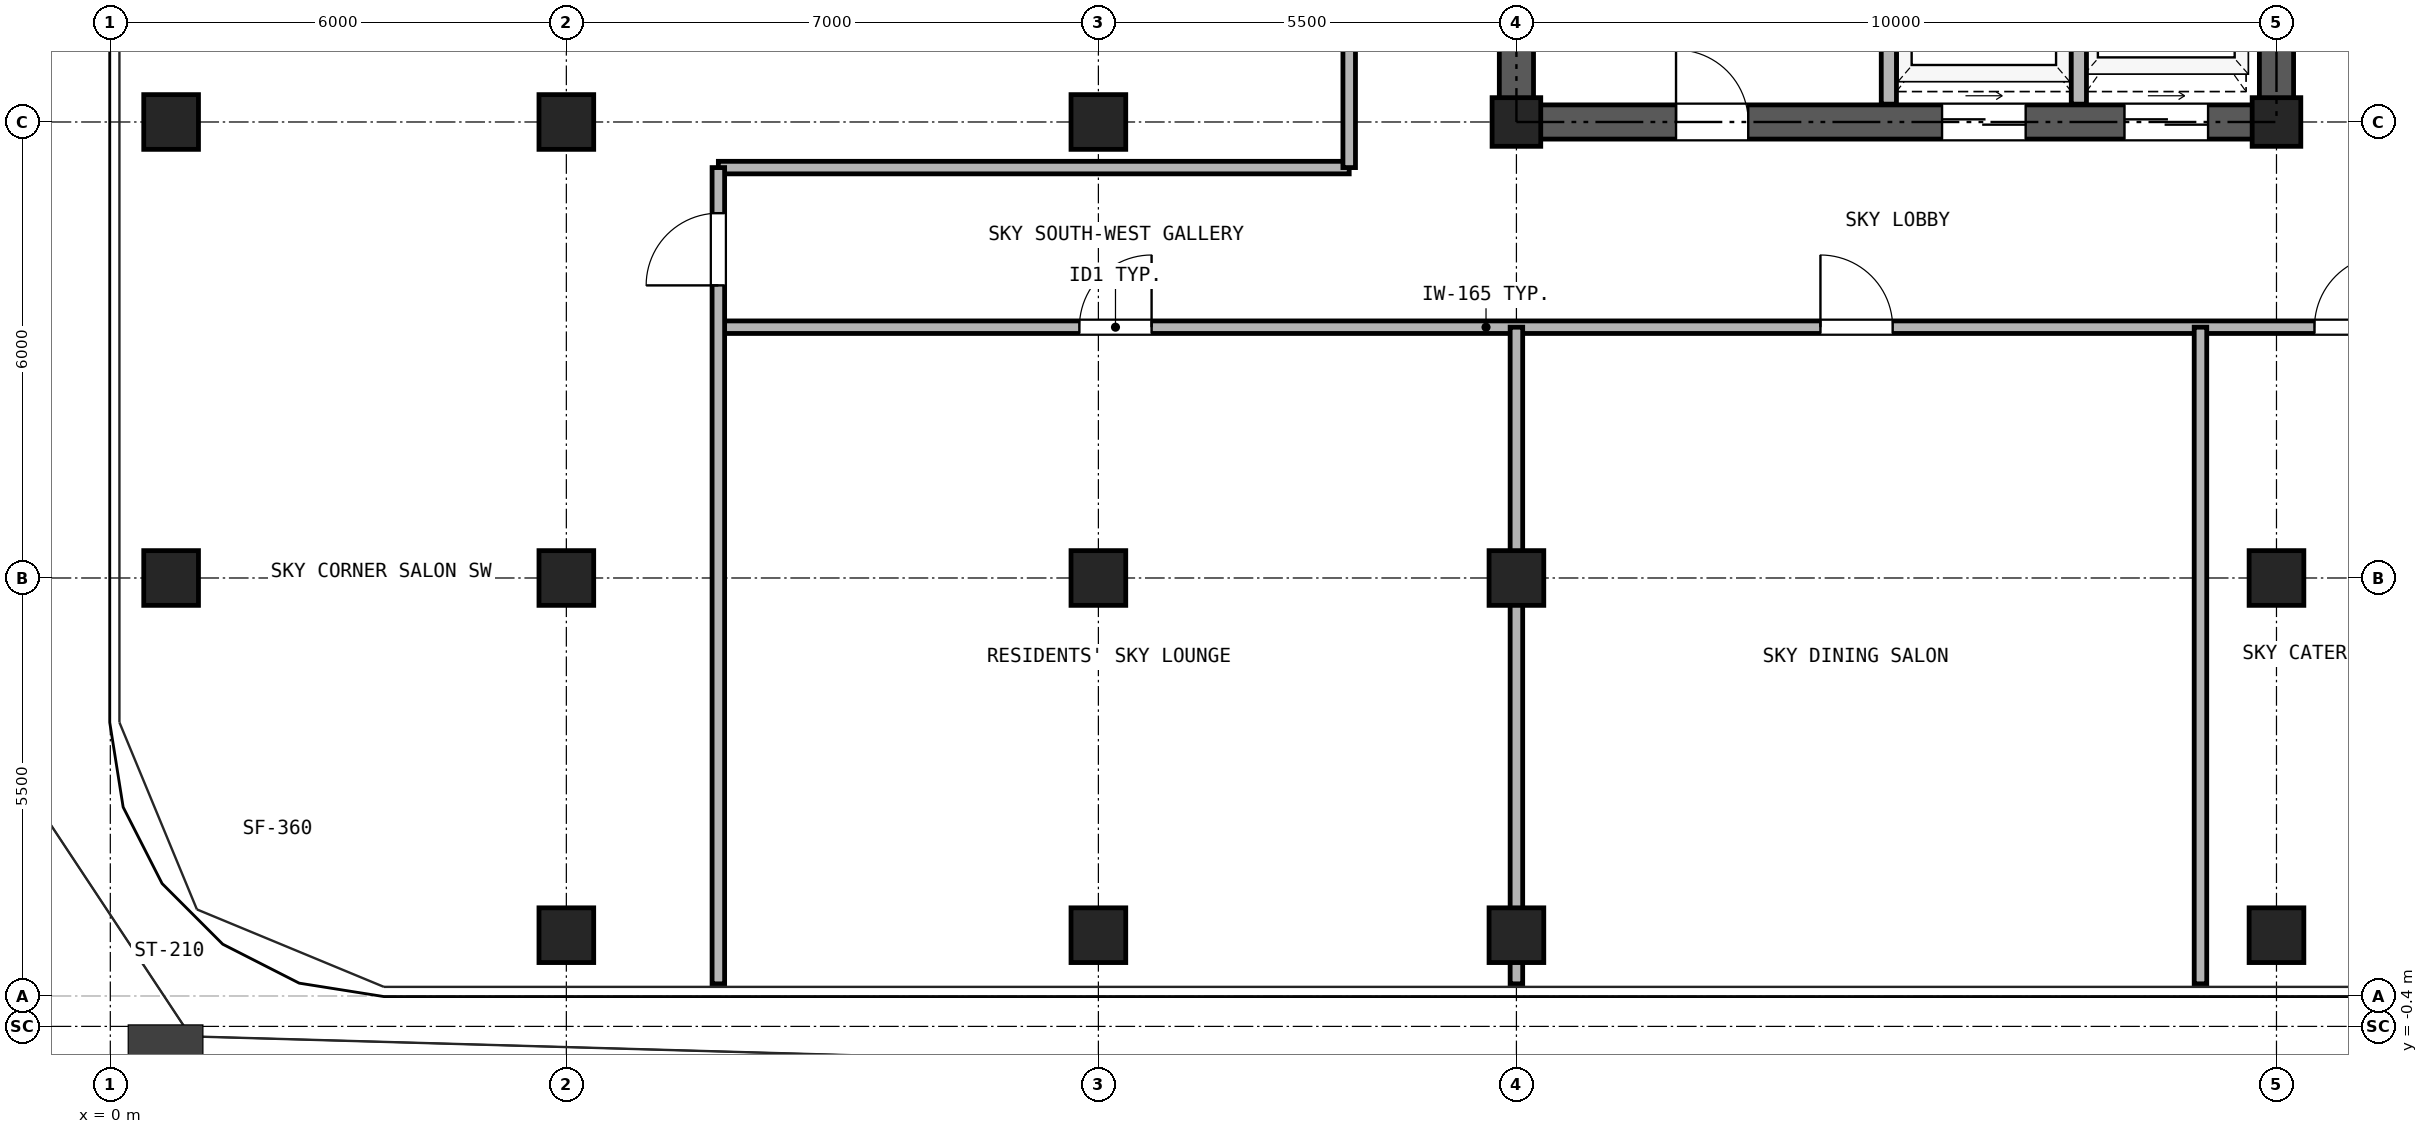
"""IFC4 building model, lengths in metres.
Left out: names, types, materials, properties, quantities, classifications, styles, units other than length and angle.
Written with IfcOpenShell. Run it as: python <this file> out.ifc"""

import sys

from ifc_helpers import new_model, si_unit, direction, frame, frame_2d, origin, origin_2d, place, context, subcontext, project, spatial, rectangle, hollow_rectangle, extrude, source, transform, mapped, element, fill, save


model = new_model("IFC4")
c1 = context("Model", 3, precision=1e-05, world=origin(), true_north=direction((0.0, 1.0)))
c2 = subcontext(c1, "Body", "Model", "MODEL_VIEW")
j1 = project(units=[si_unit("LENGTHUNIT", "METRE"), si_unit("PLANEANGLEUNIT", "RADIAN")], contexts=[c1])
p1 = place(None, origin())
s1 = spatial("IfcSite", under=j1, at=p1, CompositionType="ELEMENT")
p2 = place(p1, origin())
s2 = spatial("IfcBuilding", under=s1, at=p2, CompositionType="ELEMENT")
p3 = place(p2, frame((0.0, 0.0, 151.6)))
s3 = spatial("IfcBuildingStorey", under=s2, at=p3, CompositionType="ELEMENT", Elevation=151.6)
m1 = source(origin(), c2, "Body", "SweptSolid", [
    extrude(hollow_rectangle(XDim=0.72, YDim=0.72, WallThickness=0.04, at=origin_2d()), origin(), (0.0, 0.0, 1.0), 4.25),
])
for number, where, z_axis, x_axis in (
    (1, (6.0, 0.8, 0.0), (0.0, 0.0, 1.0), (1.0, 0.0, 0.0)),
    (2, (13.0, 0.8, 0.0), (0.0, 0.0, 1.0), (1.0, 0.0, 0.0)),
    (3, (18.5, 0.8, 0.0), (0.0, 0.0, 1.0), (1.0, 0.0, 0.0)),
    (4, (28.5, 0.8, 0.0), (0.0, 0.0, 1.0), (1.0, 0.0, 0.0)),
    (5, (0.8, 5.5, 0.0), (0.0, 0.0, 1.0), (1.0, 0.0, 0.0)),
    (6, (0.8, 11.5, 0.0), (0.0, 0.0, 1.0), (1.0, 0.0, 0.0)),
    (7, (6.0, 5.5, 0.0), (0.0, 0.0, 1.0), (1.0, 0.0, 0.0)),
    (8, (6.0, 11.5, 0.0), (0.0, 0.0, 1.0), (1.0, 0.0, 0.0)),
    (9, (13.0, 5.5, 0.0), (0.0, 0.0, 1.0), (1.0, 0.0, 0.0)),
    (10, (13.0, 11.5, 0.0), (0.0, 0.0, 1.0), (1.0, 0.0, 0.0)),
    (11, (18.5, 5.5, 0.0), (0.0, 0.0, 1.0), (1.0, 0.0, 0.0)),
):
    element("IfcColumn", number, at=place(p3, frame(where, z_axis=z_axis, x_axis=x_axis)), inside=s3, PredefinedType="COLUMN", context=c2, shape_type="MappedRepresentation", body=[
        mapped(m1, transform((0.0, 0.0, 0.0), x_axis=(1.0, 0.0, 0.0), y_axis=(0.0, 1.0, 0.0), z_axis=(0.0, 0.0, 1.0), scale=1.0)),
    ])
m2 = source(origin(), c2, "Body", "SweptSolid", [
    extrude(hollow_rectangle(XDim=0.64, YDim=0.64, WallThickness=0.035, at=origin_2d()), origin(), (0.0, 0.0, 1.0), 4.25),
])
p4 = place(p3, frame((18.5, 11.5, 0.0), z_axis=(0.0, 0.0, 1.0), x_axis=(1.0, 0.0, 0.0)))
e12 = element("IfcColumn", 12, at=p4, inside=s3, PredefinedType="COLUMN", context=c2, shape_type="MappedRepresentation", body=[
    mapped(m2, transform((0.0, 0.0, 0.0), x_axis=(1.0, 0.0, 0.0), y_axis=(0.0, 1.0, 0.0), z_axis=(0.0, 0.0, 1.0), scale=1.0)),
])
p5 = place(p3, frame((28.5, 5.5, 0.0), z_axis=(0.0, 0.0, 1.0), x_axis=(1.0, 0.0, 0.0)))
e13 = element("IfcColumn", 13, at=p5, inside=s3, PredefinedType="COLUMN", context=c2, shape_type="MappedRepresentation", body=[
    mapped(m1, transform((0.0, 0.0, 0.0), x_axis=(1.0, 0.0, 0.0), y_axis=(0.0, 1.0, 0.0), z_axis=(0.0, 0.0, 1.0), scale=1.0)),
])
p6 = place(p3, frame((28.5, 11.5, 0.0), z_axis=(0.0, 0.0, 1.0), x_axis=(1.0, 0.0, 0.0)))
e14 = element("IfcColumn", 14, at=p6, inside=s3, PredefinedType="COLUMN", context=c2, shape_type="MappedRepresentation", body=[
    mapped(m2, transform((0.0, 0.0, 0.0), x_axis=(1.0, 0.0, 0.0), y_axis=(0.0, 1.0, 0.0), z_axis=(0.0, 0.0, 1.0), scale=1.0)),
])
p7 = place(p3, frame((18.275, 11.5, 0.0), z_axis=(0.0, 0.0, 1.0), x_axis=(1.0, 0.0, 0.0)))
e15 = element("IfcWall", 15, at=p7, inside=s3, PredefinedType="SHEAR", context=c2, shape_type="SweptSolid", body=[
    extrude(rectangle(XDim=10.45, YDim=0.45, at=frame_2d((5.225, 0.0))), origin(), (0.0, 0.0, 1.0), 4.25),
])
p8 = place(p7, frame((2.325, 0.0, 0.0)))
e16 = element("IfcOpeningElement", 16, at=p8, cuts=e15, PredefinedType="OPENING", context=c2, shape_type="SweptSolid", body=[
    extrude(rectangle(XDim=0.95, YDim=2.15, at=frame_2d((0.475, 1.075))), frame((0.0, 0.235, 0.0), z_axis=(0.0, -1.0, 0.0), x_axis=(1.0, 0.0, 0.0)), (0.0, 0.0, 1.0), 0.47),
])
p9 = place(p7, frame((5.825, 0.0, 0.0)))
e17 = element("IfcOpeningElement", 17, at=p9, cuts=e15, PredefinedType="OPENING", context=c2, shape_type="SweptSolid", body=[
    extrude(rectangle(XDim=1.1, YDim=2.25, at=frame_2d((0.55, 1.125))), frame((0.0, 0.235, 0.0), z_axis=(0.0, -1.0, 0.0), x_axis=(1.0, 0.0, 0.0)), (0.0, 0.0, 1.0), 0.47),
])
p10 = place(p7, frame((8.225, 0.0, 0.0)))
e18 = element("IfcOpeningElement", 18, at=p10, cuts=e15, PredefinedType="OPENING", context=c2, shape_type="SweptSolid", body=[
    extrude(rectangle(XDim=1.1, YDim=2.25, at=frame_2d((0.55, 1.125))), frame((0.0, 0.235, 0.0), z_axis=(0.0, -1.0, 0.0), x_axis=(1.0, 0.0, 0.0)), (0.0, 0.0, 1.0), 0.47),
])
p11 = place(p3, frame((18.5, 11.725, 0.0), z_axis=(0.0, 0.0, 1.0), x_axis=(0.0, 1.0, 0.0)))
e19 = element("IfcWall", 19, at=p11, inside=s3, PredefinedType="SHEAR", context=c2, shape_type="SweptSolid", body=[
    extrude(rectangle(XDim=16.8, YDim=0.45, at=frame_2d((8.4, 0.0))), origin(), (0.0, 0.0, 1.0), 4.25),
])
p12 = place(p11, frame((7.425, 0.0, 0.0)))
e20 = element("IfcOpeningElement", 20, at=p12, cuts=e19, PredefinedType="OPENING", context=c2, shape_type="SweptSolid", body=[
    extrude(rectangle(XDim=1.15, YDim=2.2, at=frame_2d((0.575, 1.1))), frame((0.0, 0.235, 0.0), z_axis=(0.0, -1.0, 0.0), x_axis=(1.0, 0.0, 0.0)), (0.0, 0.0, 1.0), 0.47),
])
p13 = place(p3, frame((28.5, 11.725, 0.0), z_axis=(0.0, 0.0, 1.0), x_axis=(0.0, 1.0, 0.0)))
e21 = element("IfcWall", 21, at=p13, inside=s3, PredefinedType="SHEAR", context=c2, shape_type="SweptSolid", body=[
    extrude(rectangle(XDim=16.8, YDim=0.45, at=frame_2d((8.4, 0.0))), origin(), (0.0, 0.0, 1.0), 4.25),
])
p14 = place(p13, frame((7.425, 0.0, 0.0)))
e22 = element("IfcOpeningElement", 22, at=p14, cuts=e21, PredefinedType="OPENING", context=c2, shape_type="SweptSolid", body=[
    extrude(rectangle(XDim=1.15, YDim=2.2, at=frame_2d((0.575, 1.1))), frame((0.0, 0.235, 0.0), z_axis=(0.0, -1.0, 0.0), x_axis=(1.0, 0.0, 0.0)), (0.0, 0.0, 1.0), 0.47),
])
for number, where, z_axis, x_axis in (
    (23, (23.4, 11.735, 0.0), (0.0, 0.0, 1.0), (0.0, 1.0, 0.0)),
    (24, (25.9, 11.735, 0.0), (0.0, 0.0, 1.0), (0.0, 1.0, 0.0)),
):
    element("IfcWall", number, at=place(p3, frame(where, z_axis=z_axis, x_axis=x_axis)), inside=s3, PredefinedType="PARTITIONING", context=c2, shape_type="SweptSolid", body=[
        extrude(rectangle(XDim=3.265, YDim=0.2, at=frame_2d((1.632, 0.0))), origin(), (0.0, 0.0, 1.0), 4.25),
    ])
p15 = place(p3, frame((8.0, 8.8, 0.0), z_axis=(0.0, 0.0, 1.0), x_axis=(1.0, 0.0, 0.0)))
e25 = element("IfcWall", 25, at=p15, inside=s3, PredefinedType="PARTITIONING", context=c2, shape_type="SweptSolid", body=[
    extrude(rectangle(XDim=27.64, YDim=0.165, at=frame_2d((13.82, 0.0))), origin(), (0.0, 0.0, 1.0), 4.25),
])
p16 = place(p15, frame((4.75, 0.0, 0.0)))
e26 = element("IfcOpeningElement", 26, at=p16, cuts=e25, PredefinedType="OPENING", context=c2, shape_type="SweptSolid", body=[
    extrude(rectangle(XDim=0.95, YDim=2.15, at=frame_2d((0.475, 1.075))), frame((0.0, 0.093, 0.0), z_axis=(0.0, -1.0, 0.0), x_axis=(1.0, 0.0, 0.0)), (0.0, 0.0, 1.0), 0.185),
])
p17 = place(p15, frame((14.5, 0.0, 0.0)))
e27 = element("IfcOpeningElement", 27, at=p17, cuts=e25, PredefinedType="OPENING", context=c2, shape_type="SweptSolid", body=[
    extrude(rectangle(XDim=0.95, YDim=2.15, at=frame_2d((0.475, 1.075))), frame((0.0, 0.093, 0.0), z_axis=(0.0, -1.0, 0.0), x_axis=(1.0, 0.0, 0.0)), (0.0, 0.0, 1.0), 0.185),
])
p18 = place(p15, frame((21.0, 0.0, 0.0)))
e28 = element("IfcOpeningElement", 28, at=p18, cuts=e25, PredefinedType="OPENING", context=c2, shape_type="SweptSolid", body=[
    extrude(rectangle(XDim=0.95, YDim=2.15, at=frame_2d((0.475, 1.075))), frame((0.0, 0.093, 0.0), z_axis=(0.0, -1.0, 0.0), x_axis=(1.0, 0.0, 0.0)), (0.0, 0.0, 1.0), 0.185),
])
p19 = place(p15, frame((24.15, 0.0, 0.0)))
e29 = element("IfcOpeningElement", 29, at=p19, cuts=e25, PredefinedType="OPENING", context=c2, shape_type="SweptSolid", body=[
    extrude(rectangle(XDim=1.0, YDim=2.15, at=frame_2d((0.5, 1.075))), frame((0.0, 0.093, 0.0), z_axis=(0.0, -1.0, 0.0), x_axis=(1.0, 0.0, 0.0)), (0.0, 0.0, 1.0), 0.185),
])
p20 = place(p15, frame((26.22, 0.0, 0.0)))
e30 = element("IfcOpeningElement", 30, at=p20, cuts=e25, PredefinedType="OPENING", context=c2, shape_type="SweptSolid", body=[
    extrude(rectangle(XDim=0.92, YDim=2.1, at=frame_2d((0.46, 1.05))), frame((0.0, 0.093, 0.0), z_axis=(0.0, -1.0, 0.0), x_axis=(1.0, 0.0, 0.0)), (0.0, 0.0, 1.0), 0.185),
])
p21 = place(p3, frame((8.0, 10.9, 0.0), z_axis=(0.0, 0.0, 1.0), x_axis=(1.0, 0.0, 0.0)))
e31 = element("IfcWall", 31, at=p21, inside=s3, PredefinedType="PARTITIONING", context=c2, shape_type="SweptSolid", body=[
    extrude(rectangle(XDim=8.3, YDim=0.165, at=frame_2d((4.15, 0.0))), origin(), (0.0, 0.0, 1.0), 4.25),
])
p22 = place(p3, frame((16.3, 10.9, 0.0), z_axis=(0.0, 0.0, 1.0), x_axis=(0.0, 1.0, 0.0)))
e32 = element("IfcWall", 32, at=p22, inside=s3, PredefinedType="PARTITIONING", context=c2, shape_type="SweptSolid", body=[
    extrude(rectangle(XDim=18.35, YDim=0.165, at=frame_2d((9.175, 0.0))), origin(), (0.0, 0.0, 1.0), 4.25),
])
p23 = place(p22, frame((4.05, 0.0, 0.0)))
e33 = element("IfcOpeningElement", 33, at=p23, cuts=e32, PredefinedType="OPENING", context=c2, shape_type="SweptSolid", body=[
    extrude(rectangle(XDim=0.95, YDim=2.15, at=frame_2d((0.475, 1.075))), frame((0.0, 0.093, 0.0), z_axis=(0.0, -1.0, 0.0), x_axis=(1.0, 0.0, 0.0)), (0.0, 0.0, 1.0), 0.185),
])
p24 = place(p22, frame((13.225, 0.0, 0.0)))
e34 = element("IfcOpeningElement", 34, at=p24, cuts=e32, PredefinedType="OPENING", context=c2, shape_type="SweptSolid", body=[
    extrude(rectangle(XDim=0.95, YDim=2.15, at=frame_2d((0.475, 1.075))), frame((0.0, 0.093, 0.0), z_axis=(0.0, -1.0, 0.0), x_axis=(1.0, 0.0, 0.0)), (0.0, 0.0, 1.0), 0.185),
])
p25 = place(p3, frame((8.0, 0.16, 0.0), z_axis=(0.0, 0.0, 1.0), x_axis=(0.0, 1.0, 0.0)))
e35 = element("IfcWall", 35, at=p25, inside=s3, PredefinedType="PARTITIONING", context=c2, shape_type="SweptSolid", body=[
    extrude(rectangle(XDim=10.74, YDim=0.165, at=frame_2d((5.37, 0.0))), origin(), (0.0, 0.0, 1.0), 4.25),
])
p26 = place(p25, frame((9.19, 0.0, 0.0)))
e36 = element("IfcOpeningElement", 36, at=p26, cuts=e35, PredefinedType="OPENING", context=c2, shape_type="SweptSolid", body=[
    extrude(rectangle(XDim=0.95, YDim=2.15, at=frame_2d((0.475, 1.075))), frame((0.0, 0.093, 0.0), z_axis=(0.0, -1.0, 0.0), x_axis=(1.0, 0.0, 0.0)), (0.0, 0.0, 1.0), 0.185),
])
p27 = place(p3, frame((18.5, 0.16, 0.0), z_axis=(0.0, 0.0, 1.0), x_axis=(0.0, 1.0, 0.0)))
e37 = element("IfcWall", 37, at=p27, inside=s3, PredefinedType="PARTITIONING", context=c2, shape_type="SweptSolid", body=[
    extrude(rectangle(XDim=8.64, YDim=0.165, at=frame_2d((4.32, 0.0))), origin(), (0.0, 0.0, 1.0), 3.623),
])
p28 = place(p3, frame((27.5, 0.16, 0.0), z_axis=(0.0, 0.0, 1.0), x_axis=(0.0, 1.0, 0.0)))
e38 = element("IfcWall", 38, at=p28, inside=s3, PredefinedType="PARTITIONING", context=c2, shape_type="SweptSolid", body=[
    extrude(rectangle(XDim=8.64, YDim=0.165, at=frame_2d((4.32, 0.0))), origin(), (0.0, 0.0, 1.0), 4.25),
])
p29 = place(p8, frame((0.95, 0.0, 0.0), z_axis=(0.0, 0.0, 1.0), x_axis=(-1.0, 0.0, 0.0)))
e39 = element("IfcDoor", 39, at=p29, inside=s3, OperationType="SINGLE_SWING_LEFT", PredefinedType="DOOR", context=c2, shape_type="SweptSolid", body=[
    extrude(rectangle(XDim=0.95, YDim=2.15, at=frame_2d((0.475, 1.075))), frame((0.0, 0.025, 0.0), z_axis=(0.0, -1.0, 0.0), x_axis=(1.0, 0.0, 0.0)), (0.0, 0.0, 1.0), 0.05),
])
fill(e16, e39)
p30 = place(p9, frame((1.1, 0.0, 0.0), z_axis=(0.0, 0.0, 1.0), x_axis=(-1.0, 0.0, 0.0)))
e40 = element("IfcDoor", 40, at=p30, inside=s3, OperationType="DOUBLE_DOOR_SLIDING", PredefinedType="DOOR", context=c2, shape_type="SweptSolid", body=[
    extrude(rectangle(XDim=1.1, YDim=2.25, at=frame_2d((0.55, 1.125))), frame((0.0, 0.025, 0.0), z_axis=(0.0, -1.0, 0.0), x_axis=(1.0, 0.0, 0.0)), (0.0, 0.0, 1.0), 0.05),
])
fill(e17, e40)
p31 = place(p10, frame((1.1, 0.0, 0.0), z_axis=(0.0, 0.0, 1.0), x_axis=(-1.0, 0.0, 0.0)))
e41 = element("IfcDoor", 41, at=p31, inside=s3, OperationType="DOUBLE_DOOR_SLIDING", PredefinedType="DOOR", context=c2, shape_type="SweptSolid", body=[
    extrude(rectangle(XDim=1.1, YDim=2.25, at=frame_2d((0.55, 1.125))), frame((0.0, 0.025, 0.0), z_axis=(0.0, -1.0, 0.0), x_axis=(1.0, 0.0, 0.0)), (0.0, 0.0, 1.0), 0.05),
])
fill(e18, e41)
p32 = place(p16, frame((0.95, 0.0, 0.0), z_axis=(0.0, 0.0, 1.0), x_axis=(-1.0, 0.0, 0.0)))
e42 = element("IfcDoor", 42, at=p32, inside=s3, OperationType="SINGLE_SWING_RIGHT", PredefinedType="DOOR", context=c2, shape_type="SweptSolid", body=[
    extrude(rectangle(XDim=0.95, YDim=2.15, at=frame_2d((0.475, 1.075))), frame((0.0, 0.025, 0.0), z_axis=(0.0, -1.0, 0.0), x_axis=(1.0, 0.0, 0.0)), (0.0, 0.0, 1.0), 0.05),
])
fill(e26, e42)
p33 = place(p17, frame((0.95, 0.0, 0.0), z_axis=(0.0, 0.0, 1.0), x_axis=(-1.0, 0.0, 0.0)))
e43 = element("IfcDoor", 43, at=p33, inside=s3, OperationType="SINGLE_SWING_LEFT", PredefinedType="DOOR", context=c2, shape_type="SweptSolid", body=[
    extrude(rectangle(XDim=0.95, YDim=2.15, at=frame_2d((0.475, 1.075))), frame((0.0, 0.025, 0.0), z_axis=(0.0, -1.0, 0.0), x_axis=(1.0, 0.0, 0.0)), (0.0, 0.0, 1.0), 0.05),
])
fill(e27, e43)
p34 = place(p18, frame((0.95, 0.0, 0.0), z_axis=(0.0, 0.0, 1.0), x_axis=(-1.0, 0.0, 0.0)))
e44 = element("IfcDoor", 44, at=p34, inside=s3, OperationType="SINGLE_SWING_RIGHT", PredefinedType="DOOR", context=c2, shape_type="SweptSolid", body=[
    extrude(rectangle(XDim=0.95, YDim=2.15, at=frame_2d((0.475, 1.075))), frame((0.0, 0.025, 0.0), z_axis=(0.0, -1.0, 0.0), x_axis=(1.0, 0.0, 0.0)), (0.0, 0.0, 1.0), 0.05),
])
fill(e28, e44)
p35 = place(p26, frame((0.95, 0.0, 0.0), z_axis=(0.0, 0.0, 1.0), x_axis=(-1.0, 0.0, 0.0)))
e45 = element("IfcDoor", 45, at=p35, inside=s3, OperationType="SINGLE_SWING_LEFT", PredefinedType="DOOR", context=c2, shape_type="SweptSolid", body=[
    extrude(rectangle(XDim=0.95, YDim=2.15, at=frame_2d((0.475, 1.075))), frame((0.0, 0.025, 0.0), z_axis=(0.0, -1.0, 0.0), x_axis=(1.0, 0.0, 0.0)), (0.0, 0.0, 1.0), 0.05),
])
fill(e36, e45)
save(model, sys.argv[1])
